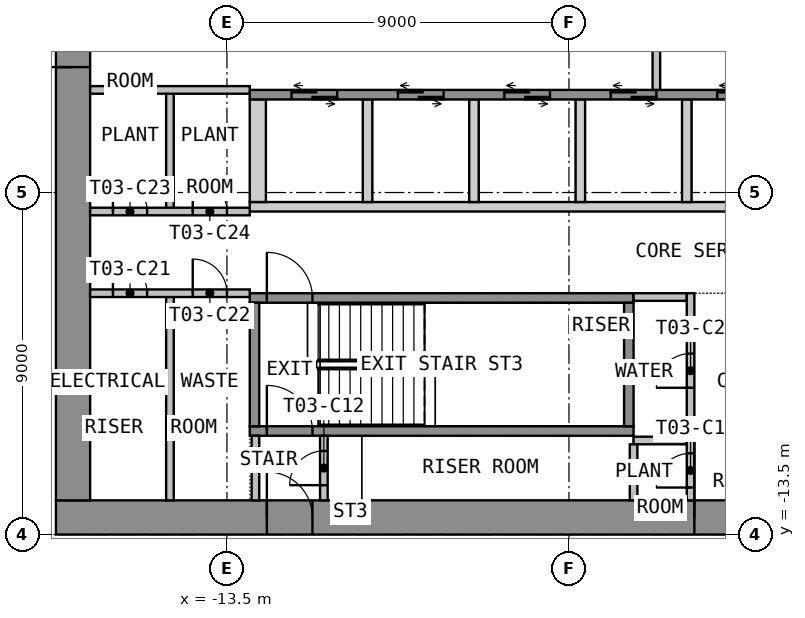
"""IFC4 building model, lengths in metres.
Left out: names, types, materials, properties, quantities, classifications, styles, units other than length and angle.
Written with IfcOpenShell. Run it as: python <this file> out.ifc"""

import sys

from ifc_helpers import new_model, si_unit, direction, frame, frame_2d, origin, place, context, subcontext, project, spatial, polyline, rectangle, outline, extrude, element, fill, save


model = new_model("IFC4")
c1 = context("Model", 3, precision=1e-05, world=origin(), true_north=direction((0.0, 1.0)))
c2 = subcontext(c1, "Body", "Model", "MODEL_VIEW")
j1 = project(units=[si_unit("LENGTHUNIT", "METRE"), si_unit("PLANEANGLEUNIT", "RADIAN")], contexts=[c1])
p1 = place(None, origin())
s1 = spatial("IfcSite", under=j1, at=p1, CompositionType="ELEMENT")
p2 = place(p1, origin())
s2 = spatial("IfcBuilding", under=s1, at=p2, CompositionType="ELEMENT")
p3 = place(p2, frame((0.0, 0.0, 53.4)))
s3 = spatial("IfcBuildingStorey", under=s2, at=p3, CompositionType="ELEMENT", Elevation=53.4)
p4 = place(p3, frame((-18.0, -13.05, 0.0), z_axis=(0.0, 0.0, 1.0), x_axis=(1.0, 0.0, 0.0)))
e1 = element("IfcWall", 1, at=p4, inside=s3, PredefinedType="SHEAR", context=c2, shape_type="SweptSolid", body=[
    extrude(rectangle(XDim=36.0, YDim=0.9, at=frame_2d((18.0, 0.0))), origin(), (0.0, 0.0, 1.0), 3.525),
])
p5 = place(p4, frame((16.8, 0.0, 0.0)))
e2 = element("IfcOpeningElement", 2, at=p5, cuts=e1, PredefinedType="OPENING", context=c2, shape_type="SweptSolid", body=[
    extrude(rectangle(XDim=2.4, YDim=2.1, at=frame_2d((1.2, 1.05))), frame((0.0, 0.46, 0.0), z_axis=(0.0, -1.0, 0.0), x_axis=(1.0, 0.0, 0.0)), (0.0, 0.0, 1.0), 0.92),
])
p6 = place(p4, frame((5.55, 0.0, 0.0)))
e3 = element("IfcOpeningElement", 3, at=p6, cuts=e1, PredefinedType="OPENING", context=c2, shape_type="SweptSolid", body=[
    extrude(rectangle(XDim=1.2, YDim=2.1, at=frame_2d((0.6, 1.05))), frame((0.0, 0.46, 0.0), z_axis=(0.0, -1.0, 0.0), x_axis=(1.0, 0.0, 0.0)), (0.0, 0.0, 1.0), 0.92),
])
p7 = place(p4, frame((29.25, 0.0, 0.0)))
e4 = element("IfcOpeningElement", 4, at=p7, cuts=e1, PredefinedType="OPENING", context=c2, shape_type="SweptSolid", body=[
    extrude(rectangle(XDim=1.2, YDim=2.1, at=frame_2d((0.6, 1.05))), frame((0.0, 0.46, 0.0), z_axis=(0.0, -1.0, 0.0), x_axis=(1.0, 0.0, 0.0)), (0.0, 0.0, 1.0), 0.92),
])
p8 = place(p3, frame((-17.55, -12.6, 0.0), z_axis=(0.0, 0.0, 1.0), x_axis=(0.0, 1.0, 0.0)))
e5 = element("IfcWall", 5, at=p8, inside=s3, PredefinedType="SHEAR", context=c2, shape_type="SweptSolid", body=[
    extrude(rectangle(XDim=25.2, YDim=0.9, at=frame_2d((12.6, 0.0))), origin(), (0.0, 0.0, 1.0), 3.525),
])
p9 = place(p8, frame((11.4, 0.0, 0.0)))
e6 = element("IfcOpeningElement", 6, at=p9, cuts=e5, PredefinedType="OPENING", context=c2, shape_type="SweptSolid", body=[
    extrude(rectangle(XDim=2.4, YDim=2.1, at=frame_2d((1.2, 1.05))), frame((0.0, 0.46, 0.0), z_axis=(0.0, -1.0, 0.0), x_axis=(1.0, 0.0, 0.0)), (0.0, 0.0, 1.0), 0.92),
])
p10 = place(p3, origin())
e7 = element("IfcWall", 7, at=p10, inside=s3, PredefinedType="SHEAR", context=c2, shape_type="SweptSolid", body=[
    extrude(outline(polyline([(-12.9, -5.0), (12.9, -5.0), (12.9, -4.75), (-12.9, -4.75), (-12.9, -5.0)])), origin(), (0.0, 0.0, 1.0), 3.525),
])
p11 = place(p3, origin())
e8 = element("IfcWall", 8, at=p11, inside=s3, PredefinedType="SHEAR", context=c2, shape_type="SweptSolid", body=[
    extrude(outline(polyline([(-12.9, -4.75), (-12.475, -4.75), (-12.475, -2.05), (-12.9, -2.05), (-12.9, -4.75)])), origin(), (0.0, 0.0, 1.0), 3.525),
])
p12 = place(p3, origin())
e9 = element("IfcWall", 9, at=p12, inside=s3, PredefinedType="SHEAR", context=c2, shape_type="SweptSolid", body=[
    extrude(outline(polyline([(-9.925, -4.75), (-9.675, -4.75), (-9.675, -2.05), (-9.925, -2.05), (-9.925, -4.75)])), origin(), (0.0, 0.0, 1.0), 3.525),
])
p13 = place(p3, origin())
e10 = element("IfcWall", 10, at=p13, inside=s3, PredefinedType="SHEAR", context=c2, shape_type="SweptSolid", body=[
    extrude(outline(polyline([(-7.125, -4.75), (-6.875, -4.75), (-6.875, -2.05), (-7.125, -2.05), (-7.125, -4.75)])), origin(), (0.0, 0.0, 1.0), 3.525),
])
p14 = place(p3, origin())
e11 = element("IfcWall", 11, at=p14, inside=s3, PredefinedType="SHEAR", context=c2, shape_type="SweptSolid", body=[
    extrude(outline(polyline([(-4.325, -4.75), (-4.075, -4.75), (-4.075, -2.05), (-4.325, -2.05), (-4.325, -4.75)])), origin(), (0.0, 0.0, 1.0), 3.525),
])
p15 = place(p3, origin())
e12 = element("IfcWall", 12, at=p15, inside=s3, PredefinedType="SHEAR", context=c2, shape_type="SweptSolid", body=[
    extrude(outline(polyline([(-1.525, -4.75), (-1.275, -4.75), (-1.275, -2.05), (-1.525, -2.05), (-1.525, -4.75)])), origin(), (0.0, 0.0, 1.0), 3.525),
])
p16 = place(p3, frame((-12.9, -1.925, 0.0), z_axis=(0.0, 0.0, 1.0), x_axis=(1.0, 0.0, 0.0)))
e13 = element("IfcWall", 13, at=p16, inside=s3, PredefinedType="SHEAR", context=c2, shape_type="SweptSolid", body=[
    extrude(rectangle(XDim=25.8, YDim=0.25, at=frame_2d((12.9, 0.0))), origin(), (0.0, 0.0, 1.0), 3.525),
])
p17 = place(p16, frame((1.1, 0.0, 0.0)))
e14 = element("IfcOpeningElement", 14, at=p17, cuts=e13, PredefinedType="OPENING", context=c2, shape_type="SweptSolid", body=[
    extrude(rectangle(XDim=1.2, YDim=2.1, at=frame_2d((0.6, 1.05))), frame((0.0, 0.135, 0.0), z_axis=(0.0, -1.0, 0.0), x_axis=(1.0, 0.0, 0.0)), (0.0, 0.0, 1.0), 0.27),
])
p18 = place(p16, frame((3.9, 0.0, 0.0)))
e15 = element("IfcOpeningElement", 15, at=p18, cuts=e13, PredefinedType="OPENING", context=c2, shape_type="SweptSolid", body=[
    extrude(rectangle(XDim=1.2, YDim=2.1, at=frame_2d((0.6, 1.05))), frame((0.0, 0.135, 0.0), z_axis=(0.0, -1.0, 0.0), x_axis=(1.0, 0.0, 0.0)), (0.0, 0.0, 1.0), 0.27),
])
p19 = place(p16, frame((6.7, 0.0, 0.0)))
e16 = element("IfcOpeningElement", 16, at=p19, cuts=e13, PredefinedType="OPENING", context=c2, shape_type="SweptSolid", body=[
    extrude(rectangle(XDim=1.2, YDim=2.1, at=frame_2d((0.6, 1.05))), frame((0.0, 0.135, 0.0), z_axis=(0.0, -1.0, 0.0), x_axis=(1.0, 0.0, 0.0)), (0.0, 0.0, 1.0), 0.27),
])
p20 = place(p16, frame((9.5, 0.0, 0.0)))
e17 = element("IfcOpeningElement", 17, at=p20, cuts=e13, PredefinedType="OPENING", context=c2, shape_type="SweptSolid", body=[
    extrude(rectangle(XDim=1.2, YDim=2.1, at=frame_2d((0.6, 1.05))), frame((0.0, 0.135, 0.0), z_axis=(0.0, -1.0, 0.0), x_axis=(1.0, 0.0, 0.0)), (0.0, 0.0, 1.0), 0.27),
])
p21 = place(p16, frame((12.3, 0.0, 0.0)))
e18 = element("IfcOpeningElement", 18, at=p21, cuts=e13, PredefinedType="OPENING", context=c2, shape_type="SweptSolid", body=[
    extrude(rectangle(XDim=1.2, YDim=2.1, at=frame_2d((0.6, 1.05))), frame((0.0, 0.135, 0.0), z_axis=(0.0, -1.0, 0.0), x_axis=(1.0, 0.0, 0.0)), (0.0, 0.0, 1.0), 0.27),
])
p22 = place(p16, frame((15.1, 0.0, 0.0)))
e19 = element("IfcOpeningElement", 19, at=p22, cuts=e13, PredefinedType="OPENING", context=c2, shape_type="SweptSolid", body=[
    extrude(rectangle(XDim=1.2, YDim=2.1, at=frame_2d((0.6, 1.05))), frame((0.0, 0.135, 0.0), z_axis=(0.0, -1.0, 0.0), x_axis=(1.0, 0.0, 0.0)), (0.0, 0.0, 1.0), 0.27),
])
p23 = place(p3, frame((-2.2, -1.8, 0.0), z_axis=(0.0, 0.0, 1.0), x_axis=(0.0, 1.0, 0.0)))
e20 = element("IfcWall", 20, at=p23, inside=s3, PredefinedType="PARTITIONING", context=c2, shape_type="SweptSolid", body=[
    extrude(rectangle(XDim=3.6, YDim=0.2, at=frame_2d((1.8, 0.0))), origin(), (0.0, 0.0, 1.0), 3.525),
])
p24 = place(p23, frame((1.2, 0.0, 0.0)))
e21 = element("IfcOpeningElement", 21, at=p24, cuts=e20, PredefinedType="OPENING", context=c2, shape_type="SweptSolid", body=[
    extrude(rectangle(XDim=1.2, YDim=2.1, at=frame_2d((0.6, 1.05))), frame((0.0, 0.11, 0.0), z_axis=(0.0, -1.0, 0.0), x_axis=(1.0, 0.0, 0.0)), (0.0, 0.0, 1.0), 0.22),
])
p25 = place(p3, frame((-12.9, -10.775, 0.0), z_axis=(0.0, 0.0, 1.0), x_axis=(1.0, 0.0, 0.0)))
e22 = element("IfcWall", 22, at=p25, inside=s3, PredefinedType="SHEAR", context=c2, shape_type="SweptSolid", body=[
    extrude(rectangle(XDim=10.1, YDim=0.25, at=frame_2d((5.05, 0.0))), origin(), (0.0, 0.0, 1.0), 3.525),
])
p26 = place(p25, frame((0.45, 0.0, 0.0)))
e23 = element("IfcOpeningElement", 23, at=p26, cuts=e22, PredefinedType="OPENING", context=c2, shape_type="SweptSolid", body=[
    extrude(rectangle(XDim=1.2, YDim=2.1, at=frame_2d((0.6, 1.05))), frame((0.0, 0.135, 0.0), z_axis=(0.0, -1.0, 0.0), x_axis=(1.0, 0.0, 0.0)), (0.0, 0.0, 1.0), 0.27),
])
p27 = place(p3, frame((-12.9, -7.275, 0.0), z_axis=(0.0, 0.0, 1.0), x_axis=(1.0, 0.0, 0.0)))
e24 = element("IfcWall", 24, at=p27, inside=s3, PredefinedType="SHEAR", context=c2, shape_type="SweptSolid", body=[
    extrude(rectangle(XDim=10.1, YDim=0.25, at=frame_2d((5.05, 0.0))), origin(), (0.0, 0.0, 1.0), 3.525),
])
p28 = place(p27, frame((0.45, 0.0, 0.0)))
e25 = element("IfcOpeningElement", 25, at=p28, cuts=e24, PredefinedType="OPENING", context=c2, shape_type="SweptSolid", body=[
    extrude(rectangle(XDim=1.2, YDim=2.1, at=frame_2d((0.6, 1.05))), frame((0.0, 0.135, 0.0), z_axis=(0.0, -1.0, 0.0), x_axis=(1.0, 0.0, 0.0)), (0.0, 0.0, 1.0), 0.27),
])
for number, where, z_axis, x_axis in (
    (26, (-12.775, -10.65, 0.0), (0.0, 0.0, 1.0), (0.0, 1.0, 0.0)),
    (27, (-2.925, -10.65, 0.0), (0.0, 0.0, 1.0), (0.0, 1.0, 0.0)),
):
    element("IfcWall", number, at=place(p3, frame(where, z_axis=z_axis, x_axis=x_axis)), inside=s3, PredefinedType="SHEAR", context=c2, shape_type="SweptSolid", body=[
        extrude(rectangle(XDim=3.25, YDim=0.25, at=frame_2d((1.625, 0.0))), origin(), (0.0, 0.0, 1.0), 3.525),
    ])
for number, where, z_axis, x_axis in (
    (28, (-2.8, -7.25, 0.0), (0.0, 0.0, 1.0), (1.0, 0.0, 0.0)),
    (29, (-2.8, -11.025, 0.0), (0.0, 0.0, 1.0), (1.0, 0.0, 0.0)),
):
    element("IfcWall", number, at=place(p3, frame(where, z_axis=z_axis, x_axis=x_axis)), inside=s3, PredefinedType="PARTITIONING", context=c2, shape_type="SweptSolid", body=[
        extrude(rectangle(XDim=1.4, YDim=0.2, at=frame_2d((0.7, 0.0))), origin(), (0.0, 0.0, 1.0), 3.525),
    ])
p29 = place(p3, frame((-1.3, -12.6, 0.0), z_axis=(0.0, 0.0, 1.0), x_axis=(0.0, 1.0, 0.0)))
e30 = element("IfcWall", 30, at=p29, inside=s3, PredefinedType="PARTITIONING", context=c2, shape_type="SweptSolid", body=[
    extrude(rectangle(XDim=5.45, YDim=0.2, at=frame_2d((2.725, 0.0))), origin(), (0.0, 0.0, 1.0), 3.525),
])
p30 = place(p29, frame((0.337, 0.0, 0.0)))
e31 = element("IfcOpeningElement", 31, at=p30, cuts=e30, PredefinedType="OPENING", context=c2, shape_type="SweptSolid", body=[
    extrude(rectangle(XDim=0.9, YDim=2.1, at=frame_2d((0.45, 1.05))), frame((0.0, 0.11, 0.0), z_axis=(0.0, -1.0, 0.0), x_axis=(1.0, 0.0, 0.0)), (0.0, 0.0, 1.0), 0.22),
])
p31 = place(p29, frame((2.962, 0.0, 0.0)))
e32 = element("IfcOpeningElement", 32, at=p31, cuts=e30, PredefinedType="OPENING", context=c2, shape_type="SweptSolid", body=[
    extrude(rectangle(XDim=0.9, YDim=2.1, at=frame_2d((0.45, 1.05))), frame((0.0, 0.11, 0.0), z_axis=(0.0, -1.0, 0.0), x_axis=(1.0, 0.0, 0.0)), (0.0, 0.0, 1.0), 0.22),
])
p32 = place(p3, frame((-12.75, -12.6, 0.0), z_axis=(0.0, 0.0, 1.0), x_axis=(0.0, 1.0, 0.0)))
e33 = element("IfcWall", 33, at=p32, inside=s3, PredefinedType="PARTITIONING", context=c2, shape_type="SweptSolid", body=[
    extrude(rectangle(XDim=1.7, YDim=0.2, at=frame_2d((0.85, 0.0))), origin(), (0.0, 0.0, 1.0), 3.525),
])
p33 = place(p3, frame((-10.95, -12.6, 0.0), z_axis=(0.0, 0.0, 1.0), x_axis=(0.0, 1.0, 0.0)))
e34 = element("IfcWall", 34, at=p33, inside=s3, PredefinedType="PARTITIONING", context=c2, shape_type="SweptSolid", body=[
    extrude(rectangle(XDim=1.7, YDim=0.2, at=frame_2d((0.85, 0.0))), origin(), (0.0, 0.0, 1.0), 3.525),
])
p34 = place(p33, frame((0.4, 0.0, 0.0)))
e35 = element("IfcOpeningElement", 35, at=p34, cuts=e34, PredefinedType="OPENING", context=c2, shape_type="SweptSolid", body=[
    extrude(rectangle(XDim=0.9, YDim=2.1, at=frame_2d((0.45, 1.05))), frame((0.0, 0.11, 0.0), z_axis=(0.0, -1.0, 0.0), x_axis=(1.0, 0.0, 0.0)), (0.0, 0.0, 1.0), 0.22),
])
p35 = place(p3, frame((-15.0, -12.6, 0.0), z_axis=(0.0, 0.0, 1.0), x_axis=(0.0, 1.0, 0.0)))
e36 = element("IfcWall", 36, at=p35, inside=s3, PredefinedType="PARTITIONING", context=c2, shape_type="SweptSolid", body=[
    extrude(rectangle(XDim=5.45, YDim=0.2, at=frame_2d((2.725, 0.0))), origin(), (0.0, 0.0, 1.0), 3.525),
])
p36 = place(p3, frame((-17.1, -7.15, 0.0), z_axis=(0.0, 0.0, 1.0), x_axis=(1.0, 0.0, 0.0)))
e37 = element("IfcWall", 37, at=p36, inside=s3, PredefinedType="PARTITIONING", context=c2, shape_type="SweptSolid", body=[
    extrude(rectangle(XDim=4.2, YDim=0.2, at=frame_2d((2.1, 0.0))), origin(), (0.0, 0.0, 1.0), 3.525),
])
p37 = place(p36, frame((0.6, 0.0, 0.0)))
e38 = element("IfcOpeningElement", 38, at=p37, cuts=e37, PredefinedType="OPENING", context=c2, shape_type="SweptSolid", body=[
    extrude(rectangle(XDim=0.9, YDim=2.1, at=frame_2d((0.45, 1.05))), frame((0.0, 0.11, 0.0), z_axis=(0.0, -1.0, 0.0), x_axis=(1.0, 0.0, 0.0)), (0.0, 0.0, 1.0), 0.22),
])
p38 = place(p36, frame((2.7, 0.0, 0.0)))
e39 = element("IfcOpeningElement", 39, at=p38, cuts=e37, PredefinedType="OPENING", context=c2, shape_type="SweptSolid", body=[
    extrude(rectangle(XDim=0.9, YDim=2.1, at=frame_2d((0.45, 1.05))), frame((0.0, 0.11, 0.0), z_axis=(0.0, -1.0, 0.0), x_axis=(1.0, 0.0, 0.0)), (0.0, 0.0, 1.0), 0.22),
])
p39 = place(p3, frame((-15.0, -5.0, 0.0), z_axis=(0.0, 0.0, 1.0), x_axis=(0.0, 1.0, 0.0)))
e40 = element("IfcWall", 40, at=p39, inside=s3, PredefinedType="PARTITIONING", context=c2, shape_type="SweptSolid", body=[
    extrude(rectangle(XDim=3.2, YDim=0.2, at=frame_2d((1.6, 0.0))), origin(), (0.0, 0.0, 1.0), 3.525),
])
p40 = place(p3, frame((-17.1, -5.0, 0.0), z_axis=(0.0, 0.0, 1.0), x_axis=(1.0, 0.0, 0.0)))
e41 = element("IfcWall", 41, at=p40, inside=s3, PredefinedType="PARTITIONING", context=c2, shape_type="SweptSolid", body=[
    extrude(rectangle(XDim=4.2, YDim=0.2, at=frame_2d((2.1, 0.0))), origin(), (0.0, 0.0, 1.0), 3.525),
])
p41 = place(p40, frame((0.6, 0.0, 0.0)))
e42 = element("IfcOpeningElement", 42, at=p41, cuts=e41, PredefinedType="OPENING", context=c2, shape_type="SweptSolid", body=[
    extrude(rectangle(XDim=0.9, YDim=2.1, at=frame_2d((0.45, 1.05))), frame((0.0, 0.11, 0.0), z_axis=(0.0, -1.0, 0.0), x_axis=(1.0, 0.0, 0.0)), (0.0, 0.0, 1.0), 0.22),
])
p42 = place(p40, frame((2.7, 0.0, 0.0)))
e43 = element("IfcOpeningElement", 43, at=p42, cuts=e41, PredefinedType="OPENING", context=c2, shape_type="SweptSolid", body=[
    extrude(rectangle(XDim=0.9, YDim=2.1, at=frame_2d((0.45, 1.05))), frame((0.0, 0.11, 0.0), z_axis=(0.0, -1.0, 0.0), x_axis=(1.0, 0.0, 0.0)), (0.0, 0.0, 1.0), 0.22),
])
p43 = place(p3, frame((-17.1, -1.8, 0.0), z_axis=(0.0, 0.0, 1.0), x_axis=(1.0, 0.0, 0.0)))
e44 = element("IfcWall", 44, at=p43, inside=s3, PredefinedType="PARTITIONING", context=c2, shape_type="SweptSolid", body=[
    extrude(rectangle(XDim=4.2, YDim=0.2, at=frame_2d((2.1, 0.0))), origin(), (0.0, 0.0, 1.0), 3.525),
])
p44 = place(p3, frame((-2.8, -12.599, 0.0), z_axis=(0.0, 0.0, 1.0), x_axis=(0.0, 1.0, 0.0)))
e45 = element("IfcWall", 45, at=p44, inside=s3, PredefinedType="PARTITIONING", context=c2, shape_type="SweptSolid", body=[
    extrude(rectangle(XDim=1.473, YDim=0.2, at=frame_2d((0.737, 0.0))), origin(), (0.0, 0.0, 1.0), 3.525),
])
p45 = place(p9, origin())
e46 = element("IfcDoor", 46, at=p45, inside=s3, OperationType="DOUBLE_DOOR_DOUBLE_SWING", PredefinedType="DOOR", context=c2, shape_type="SweptSolid", body=[
    extrude(rectangle(XDim=2.4, YDim=2.1, at=frame_2d((1.2, 1.05))), frame((0.0, 0.025, 0.0), z_axis=(0.0, -1.0, 0.0), x_axis=(1.0, 0.0, 0.0)), (0.0, 0.0, 1.0), 0.05),
])
fill(e6, e46)
p46 = place(p5, origin())
e47 = element("IfcDoor", 47, at=p46, inside=s3, OperationType="DOUBLE_DOOR_DOUBLE_SWING", PredefinedType="DOOR", context=c2, shape_type="SweptSolid", body=[
    extrude(rectangle(XDim=2.4, YDim=2.1, at=frame_2d((1.2, 1.05))), frame((0.0, 0.025, 0.0), z_axis=(0.0, -1.0, 0.0), x_axis=(1.0, 0.0, 0.0)), (0.0, 0.0, 1.0), 0.05),
])
fill(e2, e47)
p47 = place(p6, origin())
e48 = element("IfcDoor", 48, at=p47, inside=s3, OperationType="SINGLE_SWING_RIGHT", PredefinedType="DOOR", context=c2, shape_type="SweptSolid", body=[
    extrude(rectangle(XDim=1.2, YDim=2.1, at=frame_2d((0.6, 1.05))), frame((0.0, 0.025, 0.0), z_axis=(0.0, -1.0, 0.0), x_axis=(1.0, 0.0, 0.0)), (0.0, 0.0, 1.0), 0.05),
])
fill(e3, e48)
p48 = place(p17, origin())
e49 = element("IfcDoor", 49, at=p48, inside=s3, OperationType="DOUBLE_DOOR_SLIDING", PredefinedType="DOOR", context=c2, shape_type="SweptSolid", body=[
    extrude(rectangle(XDim=1.2, YDim=2.1, at=frame_2d((0.6, 1.05))), frame((0.0, 0.025, 0.0), z_axis=(0.0, -1.0, 0.0), x_axis=(1.0, 0.0, 0.0)), (0.0, 0.0, 1.0), 0.05),
])
fill(e14, e49)
p49 = place(p18, origin())
e50 = element("IfcDoor", 50, at=p49, inside=s3, OperationType="DOUBLE_DOOR_SLIDING", PredefinedType="DOOR", context=c2, shape_type="SweptSolid", body=[
    extrude(rectangle(XDim=1.2, YDim=2.1, at=frame_2d((0.6, 1.05))), frame((0.0, 0.025, 0.0), z_axis=(0.0, -1.0, 0.0), x_axis=(1.0, 0.0, 0.0)), (0.0, 0.0, 1.0), 0.05),
])
fill(e15, e50)
p50 = place(p19, origin())
e51 = element("IfcDoor", 51, at=p50, inside=s3, OperationType="DOUBLE_DOOR_SLIDING", PredefinedType="DOOR", context=c2, shape_type="SweptSolid", body=[
    extrude(rectangle(XDim=1.2, YDim=2.1, at=frame_2d((0.6, 1.05))), frame((0.0, 0.025, 0.0), z_axis=(0.0, -1.0, 0.0), x_axis=(1.0, 0.0, 0.0)), (0.0, 0.0, 1.0), 0.05),
])
fill(e16, e51)
p51 = place(p20, origin())
e52 = element("IfcDoor", 52, at=p51, inside=s3, OperationType="DOUBLE_DOOR_SLIDING", PredefinedType="DOOR", context=c2, shape_type="SweptSolid", body=[
    extrude(rectangle(XDim=1.2, YDim=2.1, at=frame_2d((0.6, 1.05))), frame((0.0, 0.025, 0.0), z_axis=(0.0, -1.0, 0.0), x_axis=(1.0, 0.0, 0.0)), (0.0, 0.0, 1.0), 0.05),
])
fill(e17, e52)
p52 = place(p21, origin())
e53 = element("IfcDoor", 53, at=p52, inside=s3, OperationType="DOUBLE_DOOR_SLIDING", PredefinedType="DOOR", context=c2, shape_type="SweptSolid", body=[
    extrude(rectangle(XDim=1.2, YDim=2.1, at=frame_2d((0.6, 1.05))), frame((0.0, 0.025, 0.0), z_axis=(0.0, -1.0, 0.0), x_axis=(1.0, 0.0, 0.0)), (0.0, 0.0, 1.0), 0.05),
])
fill(e18, e53)
p53 = place(p28, origin())
e54 = element("IfcDoor", 54, at=p53, inside=s3, OperationType="SINGLE_SWING_LEFT", PredefinedType="DOOR", context=c2, shape_type="SweptSolid", body=[
    extrude(rectangle(XDim=1.2, YDim=2.1, at=frame_2d((0.6, 1.05))), frame((0.0, 0.025, 0.0), z_axis=(0.0, -1.0, 0.0), x_axis=(1.0, 0.0, 0.0)), (0.0, 0.0, 1.0), 0.05),
])
fill(e25, e54)
p54 = place(p30, origin())
e55 = element("IfcDoor", 55, at=p54, inside=s3, OperationType="SINGLE_SWING_LEFT", PredefinedType="DOOR", context=c2, shape_type="SweptSolid", body=[
    extrude(rectangle(XDim=0.9, YDim=2.1, at=frame_2d((0.45, 1.05))), frame((0.0, 0.025, 0.0), z_axis=(0.0, -1.0, 0.0), x_axis=(1.0, 0.0, 0.0)), (0.0, 0.0, 1.0), 0.05),
])
fill(e31, e55)
p55 = place(p31, origin())
e56 = element("IfcDoor", 56, at=p55, inside=s3, OperationType="SINGLE_SWING_LEFT", PredefinedType="DOOR", context=c2, shape_type="SweptSolid", body=[
    extrude(rectangle(XDim=0.9, YDim=2.1, at=frame_2d((0.45, 1.05))), frame((0.0, 0.025, 0.0), z_axis=(0.0, -1.0, 0.0), x_axis=(1.0, 0.0, 0.0)), (0.0, 0.0, 1.0), 0.05),
])
fill(e32, e56)
p56 = place(p26, origin())
e57 = element("IfcDoor", 57, at=p56, inside=s3, OperationType="SINGLE_SWING_RIGHT", PredefinedType="DOOR", context=c2, shape_type="SweptSolid", body=[
    extrude(rectangle(XDim=1.2, YDim=2.1, at=frame_2d((0.6, 1.05))), frame((0.0, 0.025, 0.0), z_axis=(0.0, -1.0, 0.0), x_axis=(1.0, 0.0, 0.0)), (0.0, 0.0, 1.0), 0.05),
])
fill(e23, e57)
p57 = place(p34, origin())
e58 = element("IfcDoor", 58, at=p57, inside=s3, OperationType="SINGLE_SWING_LEFT", PredefinedType="DOOR", context=c2, shape_type="SweptSolid", body=[
    extrude(rectangle(XDim=0.9, YDim=2.1, at=frame_2d((0.45, 1.05))), frame((0.0, 0.025, 0.0), z_axis=(0.0, -1.0, 0.0), x_axis=(1.0, 0.0, 0.0)), (0.0, 0.0, 1.0), 0.05),
])
fill(e35, e58)
p58 = place(p37, origin())
e59 = element("IfcDoor", 59, at=p58, inside=s3, OperationType="SINGLE_SWING_LEFT", PredefinedType="DOOR", context=c2, shape_type="SweptSolid", body=[
    extrude(rectangle(XDim=0.9, YDim=2.1, at=frame_2d((0.45, 1.05))), frame((0.0, 0.025, 0.0), z_axis=(0.0, -1.0, 0.0), x_axis=(1.0, 0.0, 0.0)), (0.0, 0.0, 1.0), 0.05),
])
fill(e38, e59)
p59 = place(p38, origin())
e60 = element("IfcDoor", 60, at=p59, inside=s3, OperationType="SINGLE_SWING_LEFT", PredefinedType="DOOR", context=c2, shape_type="SweptSolid", body=[
    extrude(rectangle(XDim=0.9, YDim=2.1, at=frame_2d((0.45, 1.05))), frame((0.0, 0.025, 0.0), z_axis=(0.0, -1.0, 0.0), x_axis=(1.0, 0.0, 0.0)), (0.0, 0.0, 1.0), 0.05),
])
fill(e39, e60)
p60 = place(p41, origin())
e61 = element("IfcDoor", 61, at=p60, inside=s3, OperationType="SINGLE_SWING_LEFT", PredefinedType="DOOR", context=c2, shape_type="SweptSolid", body=[
    extrude(rectangle(XDim=0.9, YDim=2.1, at=frame_2d((0.45, 1.05))), frame((0.0, 0.025, 0.0), z_axis=(0.0, -1.0, 0.0), x_axis=(1.0, 0.0, 0.0)), (0.0, 0.0, 1.0), 0.05),
])
fill(e42, e61)
p61 = place(p42, origin())
e62 = element("IfcDoor", 62, at=p61, inside=s3, OperationType="SINGLE_SWING_LEFT", PredefinedType="DOOR", context=c2, shape_type="SweptSolid", body=[
    extrude(rectangle(XDim=0.9, YDim=2.1, at=frame_2d((0.45, 1.05))), frame((0.0, 0.025, 0.0), z_axis=(0.0, -1.0, 0.0), x_axis=(1.0, 0.0, 0.0)), (0.0, 0.0, 1.0), 0.05),
])
fill(e43, e62)
save(model, sys.argv[1])
